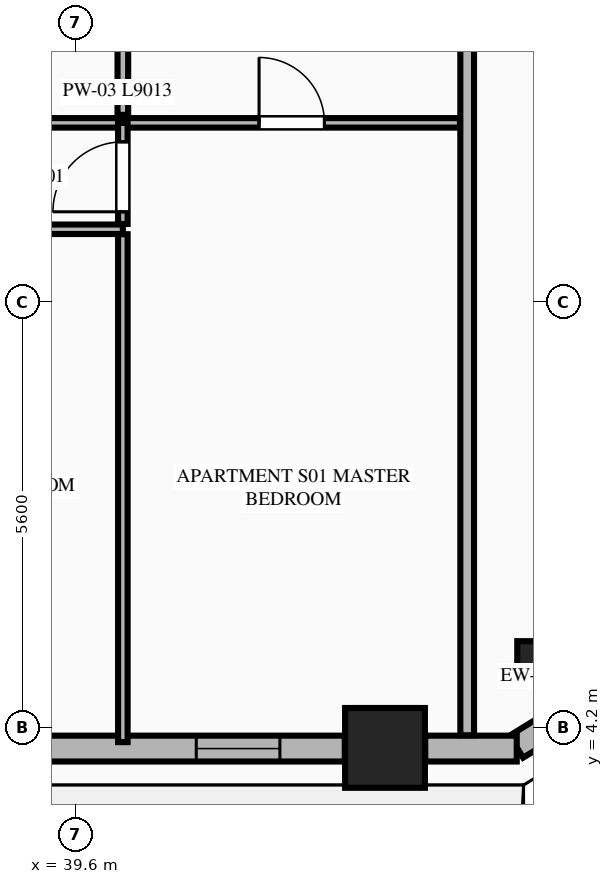
"""IFC4 building model, lengths in metres.
Left out: names, types, materials, properties, quantities, classifications, styles, units other than length and angle.
Written with IfcOpenShell. Run it as: python <this file> out.ifc"""

import sys

from ifc_helpers import new_model, si_unit, direction, frame, frame_2d, origin, origin_2d, place, context, subcontext, project, spatial, rectangle, extrude, element, fill, save


model = new_model("IFC4")
c1 = context("Model", 3, precision=1e-05, world=origin(), true_north=direction((0.0, 1.0)))
c2 = subcontext(c1, "Body", "Model", "MODEL_VIEW")
j1 = project(units=[si_unit("LENGTHUNIT", "METRE"), si_unit("PLANEANGLEUNIT", "RADIAN")], contexts=[c1])
p1 = place(None, origin())
s1 = spatial("IfcSite", under=j1, at=p1, CompositionType="ELEMENT")
p2 = place(p1, origin())
s2 = spatial("IfcBuilding", under=s1, at=p2, CompositionType="ELEMENT")
p3 = place(p2, frame((0.0, 0.0, 141.0)))
s3 = spatial("IfcBuildingStorey", under=s2, at=p3, CompositionType="ELEMENT", Elevation=141.0)
p4 = place(p3, frame((43.669, 3.939, 0.0), z_axis=(0.0, 0.0, 1.0), x_axis=(1.0, 0.0, 0.0)))
e1 = element("IfcColumn", 1, at=p4, inside=s3, PredefinedType="COLUMN", context=c2, shape_type="SweptSolid", body=[
    extrude(rectangle(XDim=1.05, YDim=1.05, at=origin_2d()), origin(), (0.0, 0.0, 1.0), 3.55),
])
p5 = place(p3, frame((45.659, 5.093, 0.0), z_axis=(0.0, 0.0, 1.0), x_axis=(0.865160173452, 0.501495637342, 0.0)))
e2 = element("IfcColumn", 2, at=p5, inside=s3, PredefinedType="PILASTER", context=c2, shape_type="SweptSolid", body=[
    extrude(rectangle(XDim=0.5, YDim=0.35, at=origin_2d()), origin(), (0.0, 0.0, 1.0), 3.55),
])
p6 = place(p3, frame((45.397, 3.955, 0.0), z_axis=(0.0, 0.0, 1.0), x_axis=(0.851798915137, 0.523868884523, 0.0)))
e3 = element("IfcWall", 3, at=p6, inside=s3, PredefinedType="STANDARD", context=c2, shape_type="SweptSolid", body=[
    extrude(rectangle(XDim=1.848, YDim=0.34, at=frame_2d((0.924, 0.0))), origin(), (0.0, 0.0, 1.0), 3.34),
])
p7 = place(p3, frame((36.761, 3.93, 0.0), z_axis=(0.0, 0.0, 1.0), x_axis=(1.0, 0.0, 0.0)))
e4 = element("IfcWall", 4, at=p7, inside=s3, PredefinedType="STANDARD", context=c2, shape_type="SweptSolid", body=[
    extrude(rectangle(XDim=6.379, YDim=0.34, at=frame_2d((3.189, 0.0))), origin(), (0.0, 0.0, 1.0), 2.797),
])
p8 = place(p7, frame((1.123, 0.0, 0.75)))
e5 = element("IfcOpeningElement", 5, at=p8, cuts=e4, PredefinedType="OPENING", context=c2, shape_type="SweptSolid", body=[
    extrude(rectangle(XDim=1.1, YDim=1.897, at=frame_2d((0.55, 0.948))), frame((0.0, 0.18, 0.0), z_axis=(0.0, -1.0, 0.0), x_axis=(1.0, 0.0, 0.0)), (0.0, 0.0, 1.0), 0.36),
])
p9 = place(p7, frame((4.425, 0.0, 0.75)))
e6 = element("IfcOpeningElement", 6, at=p9, cuts=e4, PredefinedType="OPENING", context=c2, shape_type="SweptSolid", body=[
    extrude(rectangle(XDim=1.1, YDim=1.897, at=frame_2d((0.55, 0.948))), frame((0.0, 0.18, 0.0), z_axis=(0.0, -1.0, 0.0), x_axis=(1.0, 0.0, 0.0)), (0.0, 0.0, 1.0), 0.36),
])
p10 = place(p3, frame((44.198, 3.93, 0.0), z_axis=(0.0, 0.0, 1.0), x_axis=(1.0, 0.0, 0.0)))
e7 = element("IfcWall", 7, at=p10, inside=s3, PredefinedType="STANDARD", context=c2, shape_type="SweptSolid", body=[
    extrude(rectangle(XDim=1.204, YDim=0.34, at=frame_2d((0.602, 0.0))), origin(), (0.0, 0.0, 1.0), 3.34),
])
p11 = place(p3, frame((44.75, 4.105, 0.0), z_axis=(0.0, 0.0, 1.0), x_axis=(0.0, 1.0, 0.0)))
e8 = element("IfcWall", 8, at=p11, inside=s3, PredefinedType="PARTITIONING", context=c2, shape_type="SweptSolid", body=[
    extrude(rectangle(XDim=12.395, YDim=0.18, at=frame_2d((6.198, 0.0))), origin(), (0.0, 0.0, 1.0), 3.34),
])
p12 = place(p3, frame((35.642, 12.162, 0.0), z_axis=(0.0, 0.0, 1.0), x_axis=(1.0, 0.0, 0.0)))
e9 = element("IfcWall", 9, at=p12, inside=s3, PredefinedType="PARTITIONING", context=c2, shape_type="SweptSolid", body=[
    extrude(rectangle(XDim=9.013, YDim=0.125, at=frame_2d((4.506, 0.0))), origin(), (0.0, 0.0, 1.0), 3.34),
])
p13 = place(p12, frame((6.37, 0.0, 0.0)))
e10 = element("IfcOpeningElement", 10, at=p13, cuts=e9, PredefinedType="OPENING", context=c2, shape_type="SweptSolid", body=[
    extrude(rectangle(XDim=0.86, YDim=2.1, at=frame_2d((0.43, 1.05))), frame((0.0, 0.073, 0.0), z_axis=(0.0, -1.0, 0.0), x_axis=(1.0, 0.0, 0.0)), (0.0, 0.0, 1.0), 0.145),
])
p14 = place(p12, frame((0.3, 0.0, 0.0)))
e11 = element("IfcOpeningElement", 11, at=p14, cuts=e9, PredefinedType="OPENING", context=c2, shape_type="SweptSolid", body=[
    extrude(rectangle(XDim=0.88, YDim=2.15, at=frame_2d((0.44, 1.075))), frame((0.0, 0.073, 0.0), z_axis=(0.0, -1.0, 0.0), x_axis=(1.0, 0.0, 0.0)), (0.0, 0.0, 1.0), 0.145),
])
p15 = place(p3, frame((30.95, 10.762, 0.0), z_axis=(0.0, 0.0, 1.0), x_axis=(1.0, 0.0, 0.0)))
e12 = element("IfcWall", 12, at=p15, inside=s3, PredefinedType="PARTITIONING", context=c2, shape_type="SweptSolid", body=[
    extrude(rectangle(XDim=9.27, YDim=0.125, at=frame_2d((4.635, 0.0))), origin(), (0.0, 0.0, 1.0), 3.34),
])
p16 = place(p15, frame((0.35, 0.0, 0.0)))
e13 = element("IfcOpeningElement", 13, at=p16, cuts=e12, PredefinedType="OPENING", context=c2, shape_type="SweptSolid", body=[
    extrude(rectangle(XDim=0.92, YDim=2.15, at=frame_2d((0.46, 1.075))), frame((0.0, 0.073, 0.0), z_axis=(0.0, -1.0, 0.0), x_axis=(1.0, 0.0, 0.0)), (0.0, 0.0, 1.0), 0.145),
])
p17 = place(p15, frame((5.042, 0.0, 0.0)))
e14 = element("IfcOpeningElement", 14, at=p17, cuts=e12, PredefinedType="OPENING", context=c2, shape_type="SweptSolid", body=[
    extrude(rectangle(XDim=0.92, YDim=2.15, at=frame_2d((0.46, 1.075))), frame((0.0, 0.073, 0.0), z_axis=(0.0, -1.0, 0.0), x_axis=(1.0, 0.0, 0.0)), (0.0, 0.0, 1.0), 0.145),
])
p18 = place(p3, frame((40.22, 10.832, 0.0), z_axis=(0.0, 0.0, 1.0), x_axis=(0.0, 1.0, 0.0)))
e15 = element("IfcWall", 15, at=p18, inside=s3, PredefinedType="PARTITIONING", context=c2, shape_type="SweptSolid", body=[
    extrude(rectangle(XDim=1.33, YDim=0.125, at=frame_2d((0.665, 0.0))), origin(), (0.0, 0.0, 1.0), 3.34),
])
p19 = place(p18, frame((0.16, 0.0, 0.0)))
e16 = element("IfcOpeningElement", 16, at=p19, cuts=e15, PredefinedType="OPENING", context=c2, shape_type="SweptSolid", body=[
    extrude(rectangle(XDim=0.92, YDim=2.15, at=frame_2d((0.46, 1.075))), frame((0.0, 0.073, 0.0), z_axis=(0.0, -1.0, 0.0), x_axis=(1.0, 0.0, 0.0)), (0.0, 0.0, 1.0), 0.145),
])
p20 = place(p3, frame((40.22, 4.015, 0.0), z_axis=(0.0, 0.0, 1.0), x_axis=(0.0, 1.0, 0.0)))
e17 = element("IfcWall", 17, at=p20, inside=s3, PredefinedType="PARTITIONING", context=c2, shape_type="SweptSolid", body=[
    extrude(rectangle(XDim=6.682, YDim=0.125, at=frame_2d((3.341, 0.0))), origin(), (0.0, 0.0, 1.0), 3.34),
])
p21 = place(p3, frame((40.22, 12.267, 0.0), z_axis=(0.0, 0.0, 1.0), x_axis=(0.0, 1.0, 0.0)))
e18 = element("IfcWall", 18, at=p21, inside=s3, PredefinedType="PLUMBINGWALL", context=c2, shape_type="SweptSolid", body=[
    extrude(rectangle(XDim=4.148, YDim=0.14, at=frame_2d((2.074, 0.0))), origin(), (0.0, 0.0, 1.0), 3.34),
])
p22 = place(p13, origin())
e19 = element("IfcDoor", 19, at=p22, inside=s3, OperationType="SINGLE_SWING_LEFT", PredefinedType="DOOR", context=c2, shape_type="SweptSolid", body=[
    extrude(rectangle(XDim=0.86, YDim=2.1, at=frame_2d((0.43, 1.05))), frame((0.0, 0.025, 0.0), z_axis=(0.0, -1.0, 0.0), x_axis=(1.0, 0.0, 0.0)), (0.0, 0.0, 1.0), 0.05),
])
fill(e10, e19)
p23 = place(p19, origin())
e20 = element("IfcDoor", 20, at=p23, inside=s3, OperationType="SINGLE_SWING_LEFT", PredefinedType="DOOR", context=c2, shape_type="SweptSolid", body=[
    extrude(rectangle(XDim=0.92, YDim=2.15, at=frame_2d((0.46, 1.075))), frame((0.0, 0.025, 0.0), z_axis=(0.0, -1.0, 0.0), x_axis=(1.0, 0.0, 0.0)), (0.0, 0.0, 1.0), 0.05),
])
fill(e16, e20)
p24 = place(p9, origin())
e21 = element("IfcWindow", 21, at=p24, inside=s3, PartitioningType="SINGLE_PANEL", PredefinedType="WINDOW", context=c2, shape_type="SweptSolid", body=[
    extrude(rectangle(XDim=1.1, YDim=1.897, at=frame_2d((0.55, 0.948))), frame((0.0, 0.03, 0.0), z_axis=(0.0, -1.0, 0.0), x_axis=(1.0, 0.0, 0.0)), (0.0, 0.0, 1.0), 0.06),
])
fill(e6, e21)
save(model, sys.argv[1])
